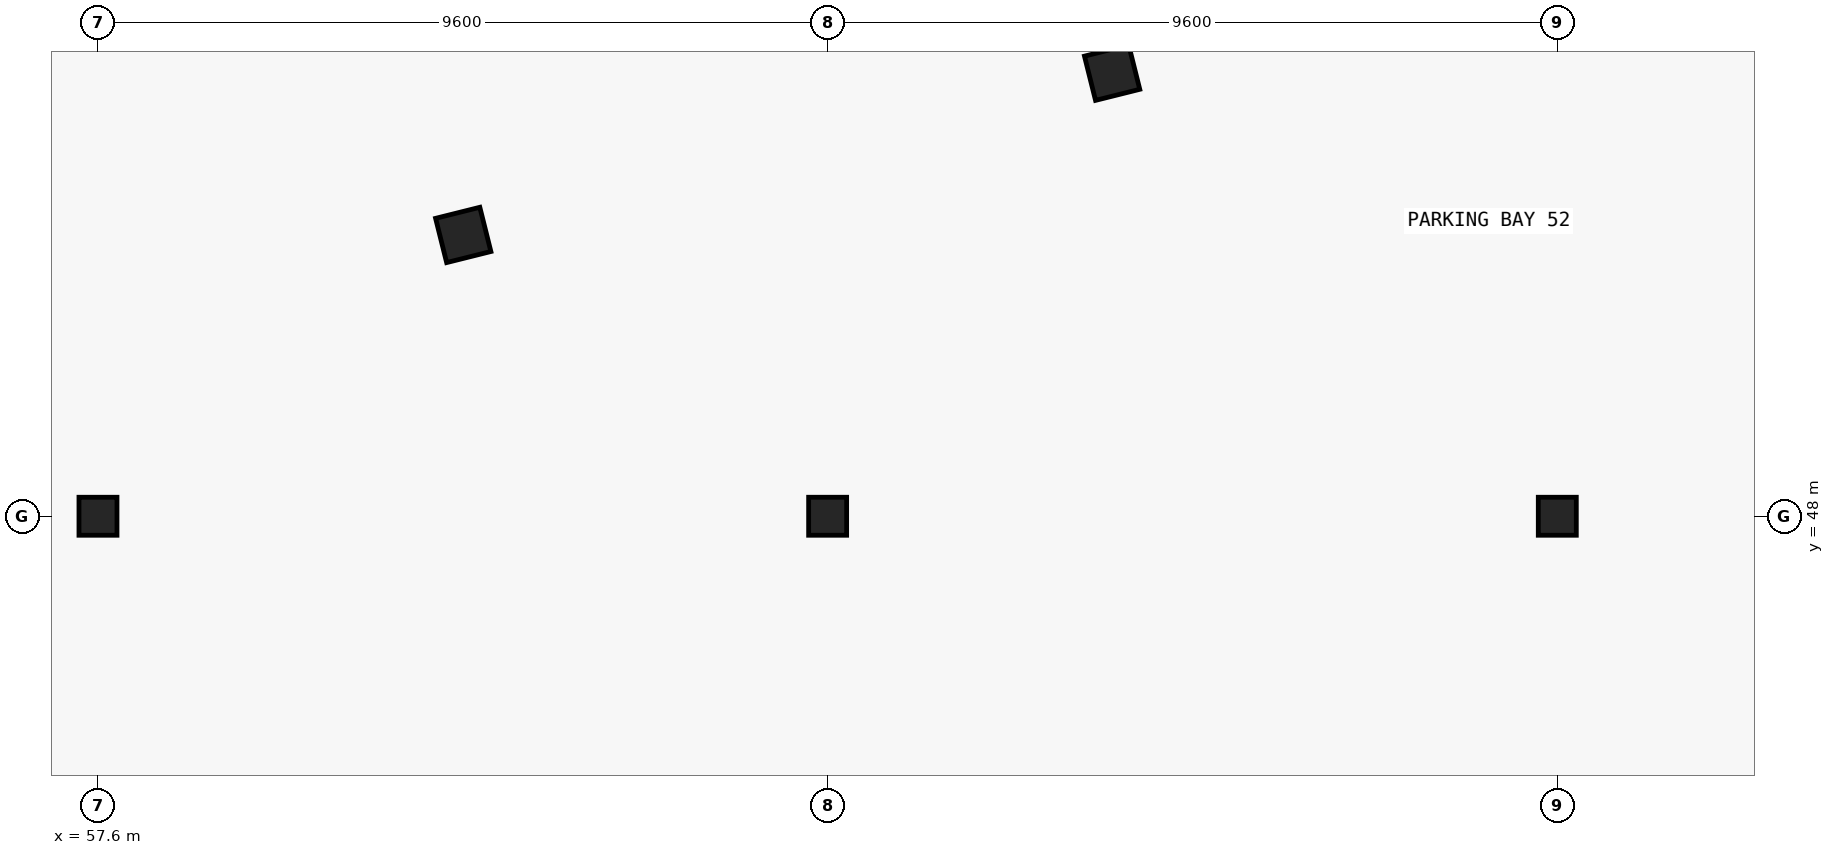
"""IFC4 building model, lengths in metres.
Left out: names, types, materials, properties, quantities, classifications, styles, units other than length and angle.
Written with IfcOpenShell. Run it as: python <this file> out.ifc"""

import sys

from ifc_helpers import new_model, si_unit, direction, frame, origin, origin_2d, place, context, subcontext, project, spatial, rectangle, extrude, element, save


model = new_model("IFC4")
c1 = context("Model", 3, precision=1e-05, world=origin(), true_north=direction((0.0, 1.0)))
c2 = subcontext(c1, "Body", "Model", "MODEL_VIEW")
j1 = project(units=[si_unit("LENGTHUNIT", "METRE"), si_unit("PLANEANGLEUNIT", "RADIAN")], contexts=[c1])
p1 = place(None, origin())
s1 = spatial("IfcSite", under=j1, at=p1, CompositionType="ELEMENT")
p2 = place(p1, origin())
s2 = spatial("IfcBuilding", under=s1, at=p2, CompositionType="ELEMENT")
p3 = place(p2, frame((0.0, 0.0, -4.55)))
s3 = spatial("IfcBuildingStorey", under=s2, at=p3, CompositionType="ELEMENT", Elevation=-4.55)
for number, where, z_axis, x_axis in (
    (1, (57.6, 48.0, 0.0), (0.0, 0.0, 1.0), (1.0, 0.0, 0.0)),
    (2, (67.2, 48.0, 0.0), (0.0, 0.0, 1.0), (1.0, 0.0, 0.0)),
    (3, (76.8, 48.0, 0.0), (0.0, 0.0, 1.0), (1.0, 0.0, 0.0)),
):
    element("IfcColumn", number, at=place(p3, frame(where, z_axis=z_axis, x_axis=x_axis)), inside=s3, PredefinedType="COLUMN", context=c2, shape_type="SweptSolid", body=[
        extrude(rectangle(XDim=0.5, YDim=0.5, at=origin_2d()), origin(), (0.0, 0.0, 1.0), 4.55),
    ])
for number, where, z_axis, x_axis in (
    (4, (62.406, 51.701, 0.0), (0.0, 0.0, 1.0), (0.97, 0.243, 0.0)),
    (5, (70.943, 53.836, 0.0), (0.0, 0.0, 1.0), (0.97, 0.243, 0.0)),
):
    element("IfcColumn", number, at=place(p3, frame(where, z_axis=z_axis, x_axis=x_axis)), inside=s3, PredefinedType="COLUMN", context=c2, shape_type="SweptSolid", body=[
        extrude(rectangle(XDim=0.6, YDim=0.6, at=origin_2d()), origin(), (0.0, 0.0, 1.0), 4.55),
    ])
save(model, sys.argv[1])
